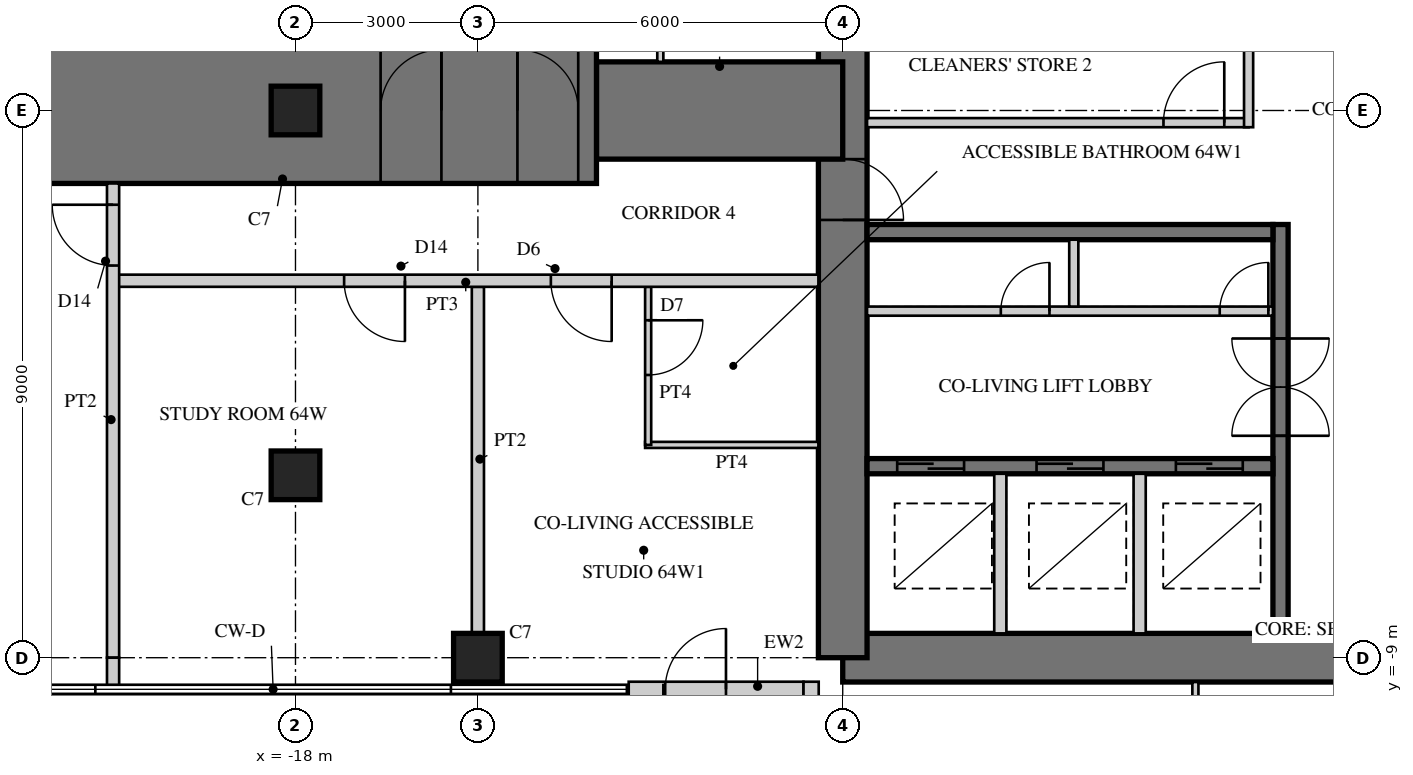
"""IFC4 building model, lengths in metres.
Left out: names, types, materials, properties, quantities, classifications, styles, units other than length and angle.
Written with IfcOpenShell. Run it as: python <this file> out.ifc"""

import sys

from ifc_helpers import new_model, si_unit, direction, frame, frame_2d, origin, origin_2d, place, context, subcontext, project, spatial, rectangle, hollow_rectangle, extrude, element, fill, save


model = new_model("IFC4")
c1 = context("Model", 3, precision=1e-05, world=origin(), true_north=direction((0.0, 1.0)))
c2 = subcontext(c1, "Body", "Model", "MODEL_VIEW")
j1 = project(units=[si_unit("LENGTHUNIT", "METRE"), si_unit("PLANEANGLEUNIT", "RADIAN")], contexts=[c1])
p1 = place(None, origin())
s1 = spatial("IfcSite", under=j1, at=p1, CompositionType="ELEMENT")
p2 = place(p1, origin())
s2 = spatial("IfcBuilding", under=s1, at=p2, CompositionType="ELEMENT")
p3 = place(p2, frame((0.0, 0.0, 249.3)))
s3 = spatial("IfcBuildingStorey", under=s2, at=p3, CompositionType="ELEMENT", Elevation=249.3)
p4 = place(p3, frame((-9.0, -9.0, 0.0), z_axis=(0.0, 0.0, 1.0), x_axis=(1.0, 0.0, 0.0)))
e1 = element("IfcWall", 1, at=p4, inside=s3, PredefinedType="SHEAR", context=c2, shape_type="SweptSolid", body=[
    extrude(rectangle(XDim=18.0, YDim=0.8, at=frame_2d((9.0, 0.0))), origin(), (0.0, 0.0, 1.0), 3.4),
])
p5 = place(p4, frame((9.8, 0.0, 0.0)))
e2 = element("IfcOpeningElement", 2, at=p5, cuts=e1, PredefinedType="OPENING", context=c2, shape_type="SweptSolid", body=[
    extrude(rectangle(XDim=1.0, YDim=2.4, at=frame_2d((0.5, 1.2))), frame((0.0, 0.41, 0.0), z_axis=(0.0, -1.0, 0.0), x_axis=(1.0, 0.0, 0.0)), (0.0, 0.0, 1.0), 0.82),
])
p6 = place(p3, frame((-9.0, 9.0, 0.0), z_axis=(0.0, 0.0, 1.0), x_axis=(0.0, -1.0, 0.0)))
e3 = element("IfcWall", 3, at=p6, inside=s3, PredefinedType="SHEAR", context=c2, shape_type="SweptSolid", body=[
    extrude(rectangle(XDim=18.0, YDim=0.8, at=frame_2d((9.0, 0.0))), origin(), (0.0, 0.0, 1.0), 3.4),
])
p7 = place(p6, frame((9.8, 0.0, 0.0)))
e4 = element("IfcOpeningElement", 4, at=p7, cuts=e3, PredefinedType="OPENING", context=c2, shape_type="SweptSolid", body=[
    extrude(rectangle(XDim=1.0, YDim=2.4, at=frame_2d((0.5, 1.2))), frame((0.0, 0.41, 0.0), z_axis=(0.0, -1.0, 0.0), x_axis=(1.0, 0.0, 0.0)), (0.0, 0.0, 1.0), 0.82),
])
p8 = place(p3, frame((-1.8, -1.875, 0.0), z_axis=(0.0, 0.0, 1.0), x_axis=(0.0, -1.0, 0.0)))
e5 = element("IfcWall", 5, at=p8, inside=s3, PredefinedType="SHEAR", context=c2, shape_type="SweptSolid", body=[
    extrude(rectangle(XDim=6.725, YDim=0.25, at=frame_2d((3.363, 0.0))), origin(), (0.0, 0.0, 1.0), 3.4),
])
p9 = place(p8, frame((1.875, 0.0, 0.0)))
e6 = element("IfcOpeningElement", 6, at=p9, cuts=e5, PredefinedType="OPENING", context=c2, shape_type="SweptSolid", body=[
    extrude(rectangle(XDim=1.6, YDim=2.4, at=frame_2d((0.8, 1.2))), frame((0.0, 0.135, 0.0), z_axis=(0.0, -1.0, 0.0), x_axis=(1.0, 0.0, 0.0)), (0.0, 0.0, 1.0), 0.27),
])
p10 = place(p3, frame((-1.925, -2.0, 0.0), z_axis=(0.0, 0.0, 1.0), x_axis=(-1.0, 0.0, 0.0)))
e7 = element("IfcWall", 7, at=p10, inside=s3, PredefinedType="SHEAR", context=c2, shape_type="SweptSolid", body=[
    extrude(rectangle(XDim=6.675, YDim=0.25, at=frame_2d((3.337, 0.0))), origin(), (0.0, 0.0, 1.0), 3.4),
])
p11 = place(p3, frame((-1.925, -5.85, 0.0), z_axis=(0.0, 0.0, 1.0), x_axis=(-1.0, 0.0, 0.0)))
e8 = element("IfcWall", 8, at=p11, inside=s3, PredefinedType="SHEAR", context=c2, shape_type="SweptSolid", body=[
    extrude(rectangle(XDim=6.675, YDim=0.25, at=frame_2d((3.337, 0.0))), origin(), (0.0, 0.0, 1.0), 3.4),
])
p12 = place(p11, frame((0.496, 0.0, 0.0)))
e9 = element("IfcOpeningElement", 9, at=p12, cuts=e8, PredefinedType="OPENING", context=c2, shape_type="SweptSolid", body=[
    extrude(rectangle(XDim=1.1, YDim=2.2, at=frame_2d((0.55, 1.1))), frame((0.0, 0.135, 0.0), z_axis=(0.0, -1.0, 0.0), x_axis=(1.0, 0.0, 0.0)), (0.0, 0.0, 1.0), 0.27),
])
p13 = place(p11, frame((2.788, 0.0, 0.0)))
e10 = element("IfcOpeningElement", 10, at=p13, cuts=e8, PredefinedType="OPENING", context=c2, shape_type="SweptSolid", body=[
    extrude(rectangle(XDim=1.1, YDim=2.2, at=frame_2d((0.55, 1.1))), frame((0.0, 0.135, 0.0), z_axis=(0.0, -1.0, 0.0), x_axis=(1.0, 0.0, 0.0)), (0.0, 0.0, 1.0), 0.27),
])
p14 = place(p11, frame((5.079, 0.0, 0.0)))
e11 = element("IfcOpeningElement", 11, at=p14, cuts=e8, PredefinedType="OPENING", context=c2, shape_type="SweptSolid", body=[
    extrude(rectangle(XDim=1.1, YDim=2.2, at=frame_2d((0.55, 1.1))), frame((0.0, 0.135, 0.0), z_axis=(0.0, -1.0, 0.0), x_axis=(1.0, 0.0, 0.0)), (0.0, 0.0, 1.0), 0.27),
])
p15 = place(p3, frame((-1.925, -3.3, 0.0), z_axis=(0.0, 0.0, 1.0), x_axis=(-1.0, 0.0, 0.0)))
e12 = element("IfcWall", 12, at=p15, inside=s3, PredefinedType="PARTITIONING", context=c2, shape_type="SweptSolid", body=[
    extrude(rectangle(XDim=6.675, YDim=0.15, at=frame_2d((3.337, 0.0))), origin(), (0.0, 0.0, 1.0), 3.4),
])
p16 = place(p15, frame((0.075, 0.0, 0.0)))
e13 = element("IfcOpeningElement", 13, at=p16, cuts=e12, PredefinedType="OPENING", context=c2, shape_type="SweptSolid", body=[
    extrude(rectangle(XDim=0.8, YDim=2.1, at=frame_2d((0.4, 1.05))), frame((0.0, 0.085, 0.0), z_axis=(0.0, -1.0, 0.0), x_axis=(1.0, 0.0, 0.0)), (0.0, 0.0, 1.0), 0.17),
])
p17 = place(p15, frame((3.675, 0.0, 0.0)))
e14 = element("IfcOpeningElement", 14, at=p17, cuts=e12, PredefinedType="OPENING", context=c2, shape_type="SweptSolid", body=[
    extrude(rectangle(XDim=0.8, YDim=2.1, at=frame_2d((0.4, 1.05))), frame((0.0, 0.085, 0.0), z_axis=(0.0, -1.0, 0.0), x_axis=(1.0, 0.0, 0.0)), (0.0, 0.0, 1.0), 0.17),
])
p18 = place(p3, frame((-5.2, -2.125, 0.0), z_axis=(0.0, 0.0, 1.0), x_axis=(0.0, -1.0, 0.0)))
e15 = element("IfcWall", 15, at=p18, inside=s3, PredefinedType="PARTITIONING", context=c2, shape_type="SweptSolid", body=[
    extrude(rectangle(XDim=1.1, YDim=0.15, at=frame_2d((0.55, 0.0))), origin(), (0.0, 0.0, 1.0), 3.4),
])
for number, where, z_axis, x_axis in (
    (16, (-4.117, -5.975, 0.0), (0.0, 0.0, 1.0), (0.0, -1.0, 0.0)),
    (17, (-6.408, -5.975, 0.0), (0.0, 0.0, 1.0), (0.0, -1.0, 0.0)),
):
    element("IfcWall", number, at=place(p3, frame(where, z_axis=z_axis, x_axis=x_axis)), inside=s3, PredefinedType="PARTITIONING", context=c2, shape_type="SweptSolid", body=[
        extrude(rectangle(XDim=2.625, YDim=0.2, at=frame_2d((1.312, 0.0))), origin(), (0.0, 0.0, 1.0), 3.4),
    ])
p19 = place(p3, frame((-9.0, 0.0, 0.0), z_axis=(0.0, 0.0, 1.0), x_axis=(-1.0, 0.0, 0.0)))
e18 = element("IfcWall", 18, at=p19, inside=s3, PredefinedType="SHEAR", context=c2, shape_type="SweptSolid", body=[
    extrude(rectangle(XDim=4.05, YDim=1.6, at=frame_2d((2.025, 0.0))), origin(), (0.0, 0.0, 1.0), 3.4),
])
p20 = place(p3, frame((-13.05, 0.0, 0.0), z_axis=(0.0, 0.0, 1.0), x_axis=(-1.0, 0.0, 0.0)))
e19 = element("IfcWall", 19, at=p20, inside=s3, PredefinedType="SHEAR", context=c2, shape_type="SweptSolid", body=[
    extrude(rectangle(XDim=13.95, YDim=2.4, at=frame_2d((6.975, 0.0))), origin(), (0.0, 0.0, 1.0), 3.4),
])
p21 = place(p20, frame((0.3, 0.0, 0.0)))
e20 = element("IfcOpeningElement", 20, at=p21, cuts=e19, PredefinedType="OPENING", context=c2, shape_type="SweptSolid", body=[
    extrude(rectangle(XDim=1.0, YDim=2.15, at=frame_2d((0.5, 1.075))), frame((0.0, 1.21, 0.0), z_axis=(0.0, -1.0, 0.0), x_axis=(1.0, 0.0, 0.0)), (0.0, 0.0, 1.0), 2.42),
])
p22 = place(p20, frame((2.55, 0.0, 0.0)))
e21 = element("IfcOpeningElement", 21, at=p22, cuts=e19, PredefinedType="OPENING", context=c2, shape_type="SweptSolid", body=[
    extrude(rectangle(XDim=1.0, YDim=2.15, at=frame_2d((0.5, 1.075))), frame((0.0, 1.21, 0.0), z_axis=(0.0, -1.0, 0.0), x_axis=(1.0, 0.0, 0.0)), (0.0, 0.0, 1.0), 2.42),
])
p23 = place(p20, frame((9.25, 0.0, 0.0)))
e22 = element("IfcOpeningElement", 22, at=p23, cuts=e19, PredefinedType="OPENING", context=c2, shape_type="SweptSolid", body=[
    extrude(rectangle(XDim=1.0, YDim=2.0, at=frame_2d((0.5, 1.0))), frame((0.0, 1.21, 0.0), z_axis=(0.0, -1.0, 0.0), x_axis=(1.0, 0.0, 0.0)), (0.0, 0.0, 1.0), 2.42),
])
for number, where, z_axis, x_axis in (
    (23, (-15.0, -9.0, 0.0), (0.0, 0.0, 1.0), (1.0, 0.0, 0.0)),
    (24, (-18.0, 0.0, 0.0), (0.0, 0.0, 1.0), (1.0, 0.0, 0.0)),
    (25, (-18.0, -6.0, 0.0), (0.0, 0.0, 1.0), (1.0, 0.0, 0.0)),
):
    element("IfcColumn", number, at=place(p3, frame(where, z_axis=z_axis, x_axis=x_axis)), inside=s3, PredefinedType="COLUMN", context=c2, shape_type="SweptSolid", body=[
        extrude(rectangle(XDim=0.8, YDim=0.8, at=origin_2d()), origin(), (0.0, 0.0, 1.0), 3.4),
    ])
p24 = place(p3, frame((-12.52, -9.52, 0.0), z_axis=(0.0, 0.0, 1.0), x_axis=(1.0, 0.0, 0.0)))
e26 = element("IfcWall", 26, at=p24, inside=s3, PredefinedType="SOLIDWALL", context=c2, shape_type="SweptSolid", body=[
    extrude(rectangle(XDim=2.875, YDim=0.25, at=frame_2d((1.438, 0.0))), origin(), (0.0, 0.0, 1.0), 3.15),
])
p25 = place(p24, frame((0.6, 0.0, 0.0)))
e27 = element("IfcOpeningElement", 27, at=p25, cuts=e26, PredefinedType="OPENING", context=c2, shape_type="SweptSolid", body=[
    extrude(rectangle(XDim=1.0, YDim=2.2, at=frame_2d((0.5, 1.1))), frame((0.0, 0.135, 0.0), z_axis=(0.0, -1.0, 0.0), x_axis=(1.0, 0.0, 0.0)), (0.0, 0.0, 1.0), 0.27),
])
p26 = place(p3, frame((-9.52, -9.395, 0.0), z_axis=(0.0, 0.0, 1.0), x_axis=(0.0, -1.0, 0.0)))
e28 = element("IfcWall", 28, at=p26, inside=s3, PredefinedType="SOLIDWALL", context=c2, shape_type="SweptSolid", body=[
    extrude(rectangle(XDim=3.125, YDim=0.25, at=frame_2d((1.562, 0.0))), origin(), (0.0, 0.0, 1.0), 3.15),
])
p27 = place(p26, frame((0.6, 0.0, 0.0)))
e29 = element("IfcOpeningElement", 29, at=p27, cuts=e28, PredefinedType="OPENING", context=c2, shape_type="SweptSolid", body=[
    extrude(rectangle(XDim=1.0, YDim=2.2, at=frame_2d((0.5, 1.1))), frame((0.0, 0.135, 0.0), z_axis=(0.0, -1.0, 0.0), x_axis=(1.0, 0.0, 0.0)), (0.0, 0.0, 1.0), 0.27),
])
p28 = place(p3, frame((-2.325, -0.2, 0.0), z_axis=(0.0, 0.0, 1.0), x_axis=(-1.0, 0.0, 0.0)))
e30 = element("IfcWall", 30, at=p28, inside=s3, PredefinedType="PARTITIONING", context=c2, shape_type="SweptSolid", body=[
    extrude(rectangle(XDim=6.275, YDim=0.15, at=frame_2d((3.138, 0.0))), origin(), (0.0, 0.0, 1.0), 3.15),
])
p29 = place(p28, frame((0.4, 0.0, 0.0)))
e31 = element("IfcOpeningElement", 31, at=p29, cuts=e30, PredefinedType="OPENING", context=c2, shape_type="SweptSolid", body=[
    extrude(rectangle(XDim=1.0, YDim=2.1, at=frame_2d((0.5, 1.05))), frame((0.0, 0.085, 0.0), z_axis=(0.0, -1.0, 0.0), x_axis=(1.0, 0.0, 0.0)), (0.0, 0.0, 1.0), 0.17),
])
p30 = place(p3, frame((-2.325, 1.675, 0.0), z_axis=(0.0, 0.0, 1.0), x_axis=(0.0, -1.0, 0.0)))
e32 = element("IfcWall", 32, at=p30, inside=s3, PredefinedType="PARTITIONING", context=c2, shape_type="SweptSolid", body=[
    extrude(rectangle(XDim=1.95, YDim=0.15, at=frame_2d((0.975, 0.0))), origin(), (0.0, 0.0, 1.0), 3.15),
])
for number, where, z_axis, x_axis in (
    (33, (-3.2, -9.4, 0.0), (0.0, 0.0, 1.0), (0.0, -1.0, 0.0)),
    (34, (-9.4, -5.5, 0.0), (0.0, 0.0, 1.0), (-1.0, 0.0, 0.0)),
):
    element("IfcWall", number, at=place(p3, frame(where, z_axis=z_axis, x_axis=x_axis)), inside=s3, PredefinedType="PARTITIONING", context=c2, shape_type="SweptSolid", body=[
        extrude(rectangle(XDim=2.85, YDim=0.1, at=frame_2d((1.425, 0.0))), origin(), (0.0, 0.0, 1.0), 3.15),
    ])
p31 = place(p3, frame((-12.2, -2.9, 0.0), z_axis=(0.0, 0.0, 1.0), x_axis=(0.0, -1.0, 0.0)))
e35 = element("IfcWall", 35, at=p31, inside=s3, PredefinedType="PARTITIONING", context=c2, shape_type="SweptSolid", body=[
    extrude(rectangle(XDim=2.6, YDim=0.1, at=frame_2d((1.3, 0.0))), origin(), (0.0, 0.0, 1.0), 3.15),
])
p32 = place(p31, frame((0.55, 0.0, 0.0)))
e36 = element("IfcOpeningElement", 36, at=p32, cuts=e35, PredefinedType="OPENING", context=c2, shape_type="SweptSolid", body=[
    extrude(rectangle(XDim=0.9, YDim=2.1, at=frame_2d((0.45, 1.05))), frame((0.0, 0.06, 0.0), z_axis=(0.0, -1.0, 0.0), x_axis=(1.0, 0.0, 0.0)), (0.0, 0.0, 1.0), 0.12),
])
p33 = place(p3, frame((-12.0, 3.4, 0.0), z_axis=(0.0, 0.0, 1.0), x_axis=(0.0, -1.0, 0.0)))
e37 = element("IfcWall", 37, at=p33, inside=s3, PredefinedType="PARTITIONING", context=c2, shape_type="SweptSolid", body=[
    extrude(rectangle(XDim=2.6, YDim=0.1, at=frame_2d((1.3, 0.0))), origin(), (0.0, 0.0, 1.0), 3.15),
])
p34 = place(p33, frame((0.55, 0.0, 0.0)))
e38 = element("IfcOpeningElement", 38, at=p34, cuts=e37, PredefinedType="OPENING", context=c2, shape_type="SweptSolid", body=[
    extrude(rectangle(XDim=0.9, YDim=2.1, at=frame_2d((0.45, 1.05))), frame((0.0, 0.06, 0.0), z_axis=(0.0, -1.0, 0.0), x_axis=(1.0, 0.0, 0.0)), (0.0, 0.0, 1.0), 0.12),
])
p35 = place(p3, frame((-15.0, -2.9, 0.0), z_axis=(0.0, 0.0, 1.0), x_axis=(0.0, -1.0, 0.0)))
e39 = element("IfcWall", 39, at=p35, inside=s3, PredefinedType="SOLIDWALL", context=c2, shape_type="SweptSolid", body=[
    extrude(rectangle(XDim=5.7, YDim=0.2, at=frame_2d((2.85, 0.0))), origin(), (0.0, 0.0, 1.0), 2.1),
])
p36 = place(p3, frame((-9.4, -2.8, 0.0), z_axis=(0.0, 0.0, 1.0), x_axis=(-1.0, 0.0, 0.0)))
e40 = element("IfcWall", 40, at=p36, inside=s3, PredefinedType="SOLIDWALL", context=c2, shape_type="SweptSolid", body=[
    extrude(rectangle(XDim=11.6, YDim=0.2, at=frame_2d((5.8, 0.0))), origin(), (0.0, 0.0, 1.0), 3.15),
])
p37 = place(p36, frame((3.4, 0.0, 0.0)))
e41 = element("IfcOpeningElement", 41, at=p37, cuts=e40, PredefinedType="OPENING", context=c2, shape_type="SweptSolid", body=[
    extrude(rectangle(XDim=1.0, YDim=2.15, at=frame_2d((0.5, 1.075))), frame((0.0, 0.11, 0.0), z_axis=(0.0, -1.0, 0.0), x_axis=(1.0, 0.0, 0.0)), (0.0, 0.0, 1.0), 0.22),
])
p38 = place(p36, frame((6.8, 0.0, 0.0)))
e42 = element("IfcOpeningElement", 42, at=p38, cuts=e40, PredefinedType="OPENING", context=c2, shape_type="SweptSolid", body=[
    extrude(rectangle(XDim=1.0, YDim=2.2, at=frame_2d((0.5, 1.1))), frame((0.0, 0.11, 0.0), z_axis=(0.0, -1.0, 0.0), x_axis=(1.0, 0.0, 0.0)), (0.0, 0.0, 1.0), 0.22),
])
p39 = place(p3, frame((-21.0, -1.2, 0.0), z_axis=(0.0, 0.0, 1.0), x_axis=(0.0, -1.0, 0.0)))
e43 = element("IfcWall", 43, at=p39, inside=s3, PredefinedType="SOLIDWALL", context=c2, shape_type="SweptSolid", body=[
    extrude(rectangle(XDim=7.8, YDim=0.2, at=frame_2d((3.9, 0.0))), origin(), (0.0, 0.0, 1.0), 2.3),
])
p40 = place(p39, frame((0.35, 0.0, 0.0)))
e44 = element("IfcOpeningElement", 44, at=p40, cuts=e43, PredefinedType="OPENING", context=c2, shape_type="SweptSolid", body=[
    extrude(rectangle(XDim=1.0, YDim=2.2, at=frame_2d((0.5, 1.1))), frame((0.0, 0.11, 0.0), z_axis=(0.0, -1.0, 0.0), x_axis=(1.0, 0.0, 0.0)), (0.0, 0.0, 1.0), 0.22),
])
p41 = place(p3, frame((-21.0, -9.0, 0.0), z_axis=(0.0, 0.0, 1.0), x_axis=(0.0, -1.0, 0.0)))
e45 = element("IfcWall", 45, at=p41, inside=s3, PredefinedType="SOLIDWALL", context=c2, shape_type="SweptSolid", body=[
    extrude(rectangle(XDim=0.48, YDim=0.2, at=frame_2d((0.24, 0.0))), origin(), (0.0, 0.0, 1.0), 3.15),
])
p42 = place(p25, origin())
e46 = element("IfcDoor", 46, at=p42, inside=s3, OperationType="SINGLE_SWING_RIGHT", PredefinedType="DOOR", context=c2, shape_type="SweptSolid", body=[
    extrude(hollow_rectangle(XDim=1.0, YDim=2.2, WallThickness=0.06, at=frame_2d((0.5, 1.1))), frame((0.0, 0.025, 0.0), z_axis=(0.0, -1.0, 0.0), x_axis=(1.0, 0.0, 0.0)), (0.0, 0.0, 1.0), 0.05),
    extrude(rectangle(XDim=0.879, YDim=2.079, at=frame_2d((0.5, 1.1))), frame((0.0, 0.025, 0.0), z_axis=(0.0, -1.0, 0.0), x_axis=(1.0, 0.0, 0.0)), (0.0, 0.0, 1.0), 0.05),
])
fill(e27, e46)
p43 = place(p29, frame((1.0, 0.0, 0.0), z_axis=(0.0, 0.0, 1.0), x_axis=(-1.0, 0.0, 0.0)))
e47 = element("IfcDoor", 47, at=p43, inside=s3, OperationType="SINGLE_SWING_RIGHT", PredefinedType="DOOR", context=c2, shape_type="SweptSolid", body=[
    extrude(rectangle(XDim=1.0, YDim=2.1, at=frame_2d((0.5, 1.05))), frame((0.0, 0.025, 0.0), z_axis=(0.0, -1.0, 0.0), x_axis=(1.0, 0.0, 0.0)), (0.0, 0.0, 1.0), 0.05),
])
fill(e31, e47)
p44 = place(p32, origin())
e48 = element("IfcDoor", 48, at=p44, inside=s3, OperationType="SINGLE_SWING_LEFT", PredefinedType="DOOR", context=c2, shape_type="SweptSolid", body=[
    extrude(rectangle(XDim=0.9, YDim=2.1, at=frame_2d((0.45, 1.05))), frame((0.0, 0.025, 0.0), z_axis=(0.0, -1.0, 0.0), x_axis=(1.0, 0.0, 0.0)), (0.0, 0.0, 1.0), 0.05),
])
fill(e36, e48)
p45 = place(p37, origin())
e49 = element("IfcDoor", 49, at=p45, inside=s3, OperationType="SINGLE_SWING_LEFT", PredefinedType="DOOR", context=c2, shape_type="SweptSolid", body=[
    extrude(rectangle(XDim=1.0, YDim=2.15, at=frame_2d((0.5, 1.075))), frame((0.0, 0.025, 0.0), z_axis=(0.0, -1.0, 0.0), x_axis=(1.0, 0.0, 0.0)), (0.0, 0.0, 1.0), 0.05),
])
fill(e41, e49)
p46 = place(p38, origin())
e50 = element("IfcDoor", 50, at=p46, inside=s3, OperationType="SINGLE_SWING_LEFT", PredefinedType="DOOR", context=c2, shape_type="SweptSolid", body=[
    extrude(rectangle(XDim=1.0, YDim=2.2, at=frame_2d((0.5, 1.1))), frame((0.0, 0.025, 0.0), z_axis=(0.0, -1.0, 0.0), x_axis=(1.0, 0.0, 0.0)), (0.0, 0.0, 1.0), 0.05),
])
fill(e42, e50)
p47 = place(p40, frame((1.0, 0.0, 0.0), z_axis=(0.0, 0.0, 1.0), x_axis=(-1.0, 0.0, 0.0)))
e51 = element("IfcDoor", 51, at=p47, inside=s3, OperationType="SINGLE_SWING_RIGHT", PredefinedType="DOOR", context=c2, shape_type="SweptSolid", body=[
    extrude(rectangle(XDim=1.0, YDim=2.2, at=frame_2d((0.5, 1.1))), frame((0.0, 0.025, 0.0), z_axis=(0.0, -1.0, 0.0), x_axis=(1.0, 0.0, 0.0)), (0.0, 0.0, 1.0), 0.05),
])
fill(e44, e51)
p48 = place(p21, frame((1.0, 0.0, 0.0), z_axis=(0.0, 0.0, 1.0), x_axis=(-1.0, 0.0, 0.0)))
e52 = element("IfcDoor", 52, at=p48, inside=s3, OperationType="SINGLE_SWING_LEFT", PredefinedType="DOOR", context=c2, shape_type="SweptSolid", body=[
    extrude(rectangle(XDim=1.0, YDim=2.15, at=frame_2d((0.5, 1.075))), frame((0.0, 0.025, 0.0), z_axis=(0.0, -1.0, 0.0), x_axis=(1.0, 0.0, 0.0)), (0.0, 0.0, 1.0), 0.05),
])
fill(e20, e52)
p49 = place(p22, frame((1.0, 0.0, 0.0), z_axis=(0.0, 0.0, 1.0), x_axis=(-1.0, 0.0, 0.0)))
e53 = element("IfcDoor", 53, at=p49, inside=s3, OperationType="SINGLE_SWING_RIGHT", PredefinedType="DOOR", context=c2, shape_type="SweptSolid", body=[
    extrude(rectangle(XDim=1.0, YDim=2.15, at=frame_2d((0.5, 1.075))), frame((0.0, 0.025, 0.0), z_axis=(0.0, -1.0, 0.0), x_axis=(1.0, 0.0, 0.0)), (0.0, 0.0, 1.0), 0.05),
])
fill(e21, e53)
p50 = place(p7, origin())
e54 = element("IfcDoor", 54, at=p50, inside=s3, OperationType="SINGLE_SWING_RIGHT", PredefinedType="DOOR", context=c2, shape_type="SweptSolid", body=[
    extrude(rectangle(XDim=1.0, YDim=2.4, at=frame_2d((0.5, 1.2))), frame((0.0, 0.055, 0.0), z_axis=(0.0, -1.0, 0.0), x_axis=(1.0, 0.0, 0.0)), (0.0, 0.0, 1.0), 0.05),
])
fill(e4, e54)
p51 = place(p12, origin())
e55 = element("IfcDoor", 55, at=p51, inside=s3, OperationType="DOUBLE_DOOR_SLIDING", PredefinedType="DOOR", context=c2, shape_type="SweptSolid", body=[
    extrude(rectangle(XDim=1.1, YDim=2.2, at=frame_2d((0.55, 1.1))), frame((0.0, 0.025, 0.0), z_axis=(0.0, -1.0, 0.0), x_axis=(1.0, 0.0, 0.0)), (0.0, 0.0, 1.0), 0.05),
])
fill(e9, e55)
p52 = place(p13, origin())
e56 = element("IfcDoor", 56, at=p52, inside=s3, OperationType="DOUBLE_DOOR_SLIDING", PredefinedType="DOOR", context=c2, shape_type="SweptSolid", body=[
    extrude(rectangle(XDim=1.1, YDim=2.2, at=frame_2d((0.55, 1.1))), frame((0.0, 0.025, 0.0), z_axis=(0.0, -1.0, 0.0), x_axis=(1.0, 0.0, 0.0)), (0.0, 0.0, 1.0), 0.05),
])
fill(e10, e56)
p53 = place(p14, origin())
e57 = element("IfcDoor", 57, at=p53, inside=s3, OperationType="DOUBLE_DOOR_SLIDING", PredefinedType="DOOR", context=c2, shape_type="SweptSolid", body=[
    extrude(rectangle(XDim=1.1, YDim=2.2, at=frame_2d((0.55, 1.1))), frame((0.0, 0.025, 0.0), z_axis=(0.0, -1.0, 0.0), x_axis=(1.0, 0.0, 0.0)), (0.0, 0.0, 1.0), 0.05),
])
fill(e11, e57)
p54 = place(p9, origin())
e58 = element("IfcDoor", 58, at=p54, inside=s3, OperationType="DOUBLE_DOOR_DOUBLE_SWING", PredefinedType="DOOR", context=c2, shape_type="SweptSolid", body=[
    extrude(rectangle(XDim=1.6, YDim=2.4, at=frame_2d((0.8, 1.2))), frame((0.0, 0.025, 0.0), z_axis=(0.0, -1.0, 0.0), x_axis=(1.0, 0.0, 0.0)), (0.0, 0.0, 1.0), 0.05),
])
fill(e6, e58)
p55 = place(p16, frame((0.8, 0.0, 0.0), z_axis=(0.0, 0.0, 1.0), x_axis=(-1.0, 0.0, 0.0)))
e59 = element("IfcDoor", 59, at=p55, inside=s3, OperationType="SINGLE_SWING_RIGHT", PredefinedType="DOOR", context=c2, shape_type="SweptSolid", body=[
    extrude(rectangle(XDim=0.8, YDim=2.1, at=frame_2d((0.4, 1.05))), frame((0.0, 0.025, 0.0), z_axis=(0.0, -1.0, 0.0), x_axis=(1.0, 0.0, 0.0)), (0.0, 0.0, 1.0), 0.05),
])
fill(e13, e59)
p56 = place(p17, frame((0.8, 0.0, 0.0), z_axis=(0.0, 0.0, 1.0), x_axis=(-1.0, 0.0, 0.0)))
e60 = element("IfcDoor", 60, at=p56, inside=s3, OperationType="SINGLE_SWING_RIGHT", PredefinedType="DOOR", context=c2, shape_type="SweptSolid", body=[
    extrude(rectangle(XDim=0.8, YDim=2.1, at=frame_2d((0.4, 1.05))), frame((0.0, 0.025, 0.0), z_axis=(0.0, -1.0, 0.0), x_axis=(1.0, 0.0, 0.0)), (0.0, 0.0, 1.0), 0.05),
])
fill(e14, e60)
save(model, sys.argv[1])
